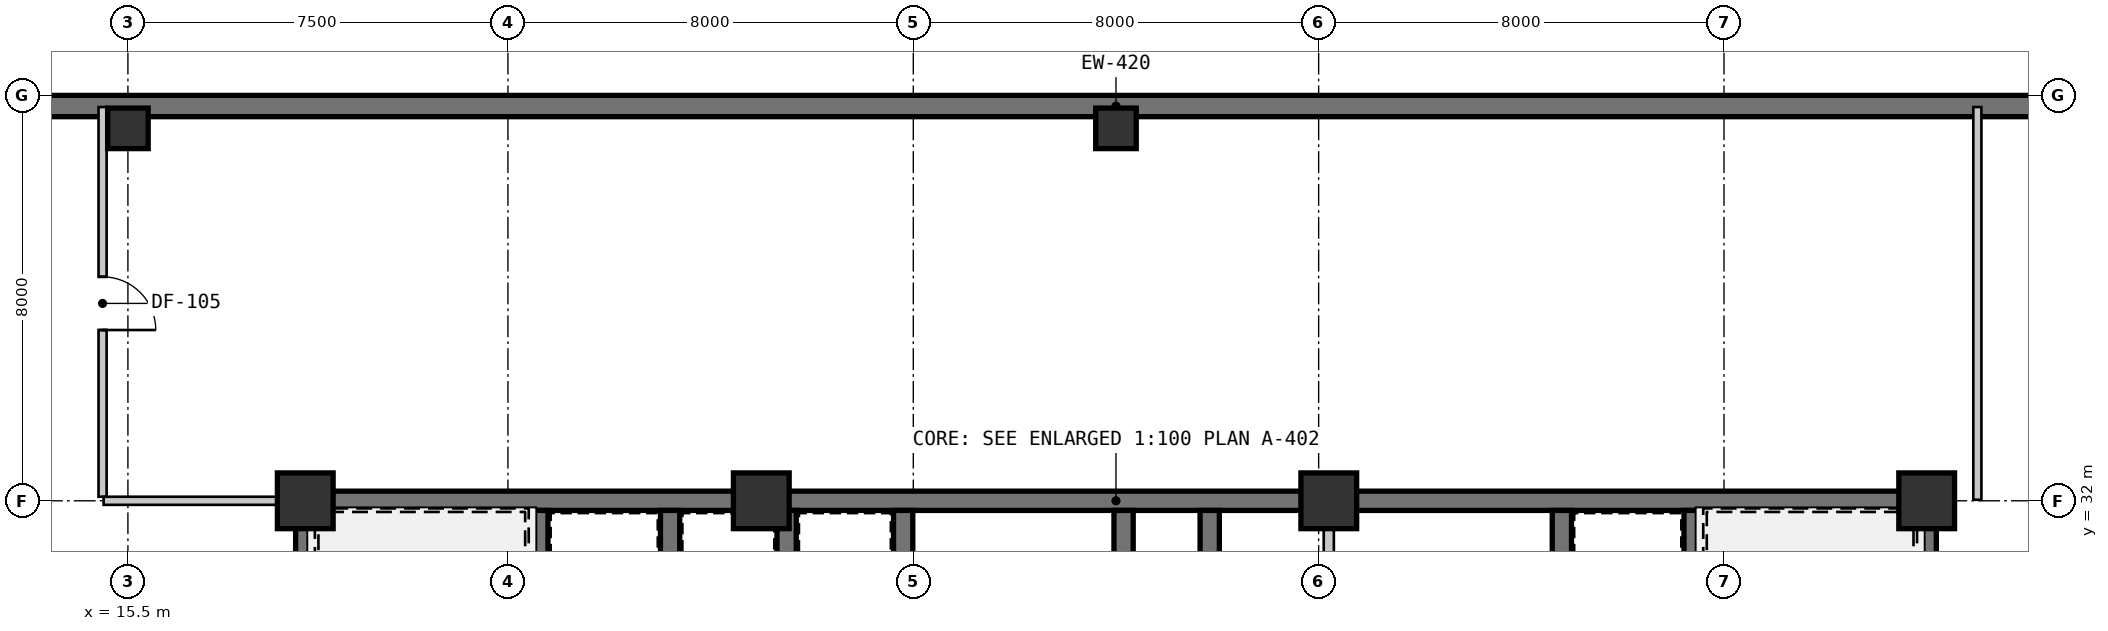
"""IFC4 building model, lengths in metres.
Left out: names, types, materials, properties, quantities, classifications, styles, units other than length and angle.
Written with IfcOpenShell. Run it as: python <this file> out.ifc"""

import sys

from ifc_helpers import new_model, si_unit, direction, frame, frame_2d, origin, origin_2d, place, context, subcontext, project, spatial, rectangle, extrude, source, transform, mapped, element, fill, save


model = new_model("IFC4")
c1 = context("Model", 3, precision=1e-05, world=origin(), true_north=direction((0.0, 1.0)))
c2 = subcontext(c1, "Body", "Model", "MODEL_VIEW")
j1 = project(units=[si_unit("LENGTHUNIT", "METRE"), si_unit("PLANEANGLEUNIT", "RADIAN")], contexts=[c1])
p1 = place(None, origin())
s1 = spatial("IfcSite", under=j1, at=p1, CompositionType="ELEMENT")
p2 = place(p1, origin())
s2 = spatial("IfcBuilding", under=s1, at=p2, CompositionType="ELEMENT")
p3 = place(p2, frame((0.0, 0.0, -4.0)))
s3 = spatial("IfcBuildingStorey", under=s2, at=p3, CompositionType="ELEMENT", Elevation=-4.0)
m1 = source(origin(), c2, "Body", "SweptSolid", [
    extrude(rectangle(XDim=1.1, YDim=1.1, at=origin_2d()), origin(), (0.0, 0.0, 1.0), 4.0),
])
for number, where, z_axis, x_axis in (
    (1, (19.0, 32.0, 0.0), (0.0, 0.0, 1.0), (1.0, 0.0, 0.0)),
    (2, (28.0, 32.0, 0.0), (0.0, 0.0, 1.0), (1.0, 0.0, 0.0)),
    (3, (39.2, 32.0, 0.0), (0.0, 0.0, 1.0), (1.0, 0.0, 0.0)),
    (4, (51.0, 32.0, 0.0), (0.0, 0.0, 1.0), (1.0, 0.0, 0.0)),
):
    element("IfcColumn", number, at=place(p3, frame(where, z_axis=z_axis, x_axis=x_axis)), inside=s3, PredefinedType="COLUMN", context=c2, shape_type="MappedRepresentation", body=[
        mapped(m1, transform((0.0, 0.0, 0.0), scale=1.0)),
    ])
m2 = source(origin(), c2, "Body", "SweptSolid", [
    extrude(rectangle(XDim=0.8, YDim=0.8, at=origin_2d()), origin(), (0.0, 0.0, 1.0), 4.0),
])
for number, where, z_axis, x_axis in (
    (5, (15.5, 39.35, 0.0), (0.0, 0.0, 1.0), (1.0, 0.0, 0.0)),
    (6, (35.0, 39.35, 0.0), (0.0, 0.0, 1.0), (1.0, 0.0, 0.0)),
):
    element("IfcColumn", number, at=place(p3, frame(where, z_axis=z_axis, x_axis=x_axis)), inside=s3, PredefinedType="COLUMN", context=c2, shape_type="MappedRepresentation", body=[
        mapped(m2, transform((0.0, 0.0, 0.0), scale=1.0)),
    ])
m3 = source(origin(), c2, "Body", "SweptSolid", [
    extrude(rectangle(XDim=69.58, YDim=0.42, at=frame_2d((34.79, 0.0))), origin(), (0.0, 0.0, 1.0), 3.74),
])
p4 = place(p3, frame((69.79, 39.79, 0.0), z_axis=(0.0, 0.0, 1.0), x_axis=(-1.0, 0.0, 0.0)))
e7 = element("IfcWall", 7, at=p4, inside=s3, PredefinedType="SOLIDWALL", context=c2, shape_type="MappedRepresentation", body=[
    mapped(m3, transform((0.0, 0.0, 0.0), scale=1.0)),
])
m4 = source(origin(), c2, "Body", "SweptSolid", [
    extrude(rectangle(XDim=9.19, YDim=0.38, at=frame_2d((4.595, 0.0))), origin(), (0.0, 0.0, 1.0), 3.74),
])
p5 = place(p3, frame((18.81, 32.0, 0.0), z_axis=(0.0, 0.0, 1.0), x_axis=(1.0, 0.0, 0.0)))
e8 = element("IfcWall", 8, at=p5, inside=s3, PredefinedType="SHEAR", context=c2, shape_type="MappedRepresentation", body=[
    mapped(m4, transform((0.0, 0.0, 0.0), scale=1.0)),
])
m5 = source(origin(), c2, "Body", "SweptSolid", [
    extrude(rectangle(XDim=11.2, YDim=0.38, at=frame_2d((5.6, 0.0))), origin(), (0.0, 0.0, 1.0), 3.74),
])
p6 = place(p3, frame((28.0, 32.0, 0.0), z_axis=(0.0, 0.0, 1.0), x_axis=(1.0, 0.0, 0.0)))
e9 = element("IfcWall", 9, at=p6, inside=s3, PredefinedType="SHEAR", context=c2, shape_type="MappedRepresentation", body=[
    mapped(m5, transform((0.0, 0.0, 0.0), scale=1.0)),
])
m6 = source(origin(), c2, "Body", "SweptSolid", [
    extrude(rectangle(XDim=11.99, YDim=0.38, at=frame_2d((5.995, 0.0))), origin(), (0.0, 0.0, 1.0), 3.74),
])
p7 = place(p3, frame((39.2, 32.0, 0.0), z_axis=(0.0, 0.0, 1.0), x_axis=(1.0, 0.0, 0.0)))
e10 = element("IfcWall", 10, at=p7, inside=s3, PredefinedType="SHEAR", context=c2, shape_type="MappedRepresentation", body=[
    mapped(m6, transform((0.0, 0.0, 0.0), scale=1.0)),
])
m7 = source(origin(), c2, "Body", "SweptSolid", [
    extrude(rectangle(XDim=3.61, YDim=0.38, at=frame_2d((1.805, 0.0))), origin(), (0.0, 0.0, 1.0), 3.74),
])
for number, where, z_axis, x_axis in (
    (11, (19.0, 28.2, 0.0), (0.0, 0.0, 1.0), (0.0, 1.0, 0.0)),
    (12, (51.0, 28.2, 0.0), (0.0, 0.0, 1.0), (0.0, 1.0, 0.0)),
):
    element("IfcWall", number, at=place(p3, frame(where, z_axis=z_axis, x_axis=x_axis)), inside=s3, PredefinedType="SHEAR", context=c2, shape_type="MappedRepresentation", body=[
        mapped(m7, transform((0.0, 0.0, 0.0), scale=1.0)),
    ])
m8 = source(origin(), c2, "Body", "SweptSolid", [
    extrude(rectangle(XDim=3.42, YDim=0.38, at=frame_2d((1.71, 0.0))), origin(), (0.0, 0.0, 1.0), 3.74),
])
for number, where, z_axis, x_axis in (
    (13, (23.6, 28.39, 0.0), (0.0, 0.0, 1.0), (0.0, 1.0, 0.0)),
    (14, (26.2, 28.39, 0.0), (0.0, 0.0, 1.0), (0.0, 1.0, 0.0)),
    (15, (46.4, 31.81, 0.0), (0.0, 0.0, 1.0), (0.0, -1.0, 0.0)),
    (16, (43.8, 31.81, 0.0), (0.0, 0.0, 1.0), (0.0, -1.0, 0.0)),
):
    element("IfcWall", number, at=place(p3, frame(where, z_axis=z_axis, x_axis=x_axis)), inside=s3, PredefinedType="SHEAR", context=c2, shape_type="MappedRepresentation", body=[
        mapped(m8, transform((0.0, 0.0, 0.0), scale=1.0)),
    ])
m9 = source(origin(), c2, "Body", "SweptSolid", [
    extrude(rectangle(XDim=1.12, YDim=0.38, at=frame_2d((0.56, 0.0))), origin(), (0.0, 0.0, 1.0), 3.74),
])
for number, where, z_axis, x_axis in (
    (17, (35.15, 31.81, 0.0), (0.0, 0.0, 1.0), (0.0, -1.0, 0.0)),
    (18, (36.85, 30.69, 0.0), (0.0, 0.0, 1.0), (0.0, 1.0, 0.0)),
):
    element("IfcWall", number, at=place(p3, frame(where, z_axis=z_axis, x_axis=x_axis)), inside=s3, PredefinedType="SHEAR", context=c2, shape_type="MappedRepresentation", body=[
        mapped(m9, transform((0.0, 0.0, 0.0), scale=1.0)),
    ])
for number, where, z_axis, x_axis in (
    (19, (28.5, 28.39, 0.0), (0.0, 0.0, 1.0), (0.0, 1.0, 0.0)),
    (20, (30.8, 28.39, 0.0), (0.0, 0.0, 1.0), (0.0, 1.0, 0.0)),
):
    element("IfcWall", number, at=place(p3, frame(where, z_axis=z_axis, x_axis=x_axis)), inside=s3, PredefinedType="SHEAR", context=c2, shape_type="MappedRepresentation", body=[
        mapped(m8, transform((0.0, 0.0, 0.0), scale=1.0)),
    ])
m10 = source(origin(), c2, "Body", "SweptSolid", [
    extrude(rectangle(XDim=7.71, YDim=0.2, at=frame_2d((3.855, 0.0))), origin(), (0.0, 0.0, 1.0), 3.28),
])
p8 = place(p3, frame((39.2, 31.81, 0.0), z_axis=(0.0, 0.0, 1.0), x_axis=(0.0, -1.0, 0.0)))
e21 = element("IfcWall", 21, at=p8, inside=s3, PredefinedType="SOLIDWALL", context=c2, shape_type="MappedRepresentation", body=[
    mapped(m10, transform((0.0, 0.0, 0.0), scale=1.0)),
])
m11 = source(origin(), c2, "Body", "SweptSolid", [
    extrude(rectangle(XDim=7.69, YDim=0.16, at=frame_2d((3.845, 0.0))), origin(), (0.0, 0.0, 1.0), 3.74),
])
p9 = place(p3, frame((15.0, 39.77, 0.0), z_axis=(0.0, 0.0, 1.0), x_axis=(0.0, -1.0, 0.0)))
e22 = element("IfcWall", 22, at=p9, inside=s3, PredefinedType="PARTITIONING", context=c2, shape_type="MappedRepresentation", body=[
    mapped(m11, transform((0.0, 0.0, 0.0), scale=1.0)),
])
m12 = source(origin(), c2, "Body", "SweptSolid", [
    extrude(rectangle(XDim=1.05, YDim=2.1, at=frame_2d((0.525, 1.05))), frame((0.0, 0.09, 0.0), z_axis=(0.0, -1.0, 0.0), x_axis=(1.0, 0.0, 0.0)), (0.0, 0.0, 1.0), 0.18),
])
p10 = place(p9, frame((3.35, 0.0, 0.0)))
e23 = element("IfcOpeningElement", 23, at=p10, cuts=e22, PredefinedType="OPENING", context=c2, shape_type="MappedRepresentation", body=[
    mapped(m12, transform((0.0, 0.0, 0.0), scale=1.0)),
])
m13 = source(origin(), c2, "Body", "SweptSolid", [
    extrude(rectangle(XDim=3.79, YDim=0.16, at=frame_2d((1.895, 0.0))), origin(), (0.0, 0.0, 1.0), 3.207),
])
p11 = place(p3, frame((15.02, 32.0, 0.0), z_axis=(0.0, 0.0, 1.0), x_axis=(1.0, 0.0, 0.0)))
e24 = element("IfcWall", 24, at=p11, inside=s3, PredefinedType="PARTITIONING", context=c2, shape_type="MappedRepresentation", body=[
    mapped(m13, transform((0.0, 0.0, 0.0), scale=1.0)),
])
m14 = source(origin(), c2, "Body", "SweptSolid", [
    extrude(rectangle(XDim=7.75, YDim=0.16, at=frame_2d((3.875, 0.0))), origin(), (0.0, 0.0, 1.0), 3.74),
])
p12 = place(p3, frame((52.0, 32.02, 0.0), z_axis=(0.0, 0.0, 1.0), x_axis=(0.0, 1.0, 0.0)))
e25 = element("IfcWall", 25, at=p12, inside=s3, PredefinedType="PARTITIONING", context=c2, shape_type="MappedRepresentation", body=[
    mapped(m14, transform((0.0, 0.0, 0.0), scale=1.0)),
])
m15 = source(origin(), c2, "Body", "SweptSolid", [
    extrude(rectangle(XDim=1.05, YDim=2.1, at=frame_2d((0.525, 1.05))), frame((0.0, 0.025, 0.0), z_axis=(0.0, -1.0, 0.0), x_axis=(1.0, 0.0, 0.0)), (0.0, 0.0, 1.0), 0.05),
])
p13 = place(p10, origin())
e26 = element("IfcDoor", 26, at=p13, inside=s3, OperationType="SINGLE_SWING_RIGHT", PredefinedType="DOOR", context=c2, shape_type="MappedRepresentation", body=[
    mapped(m15, transform((0.0, 0.0, 0.0), scale=1.0)),
])
fill(e23, e26)
save(model, sys.argv[1])
